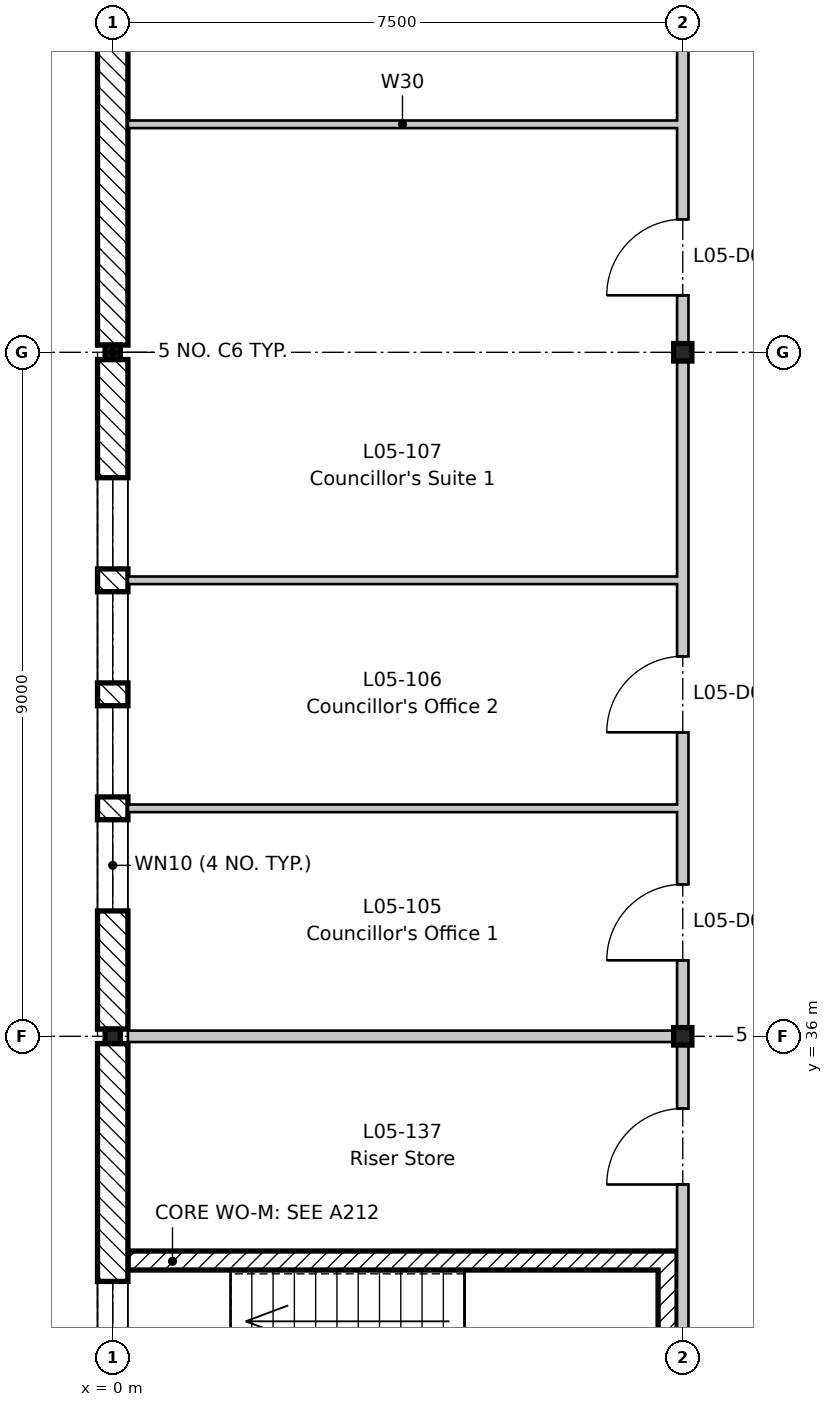
"""IFC4 building model, lengths in metres.
Left out: names, types, materials, properties, quantities, classifications, styles, units other than length and angle.
Written with IfcOpenShell. Run it as: python <this file> out.ifc"""

import sys

from ifc_helpers import new_model, si_unit, direction, frame, frame_2d, origin, origin_2d, place, context, subcontext, project, spatial, rectangle, i_section, extrude, element, fill, save


model = new_model("IFC4")
c1 = context("Model", 3, precision=1e-05, world=origin(), true_north=direction((0.0, 1.0)))
c2 = subcontext(c1, "Body", "Model", "MODEL_VIEW")
j1 = project(units=[si_unit("LENGTHUNIT", "METRE"), si_unit("PLANEANGLEUNIT", "RADIAN")], contexts=[c1])
p1 = place(None, origin())
s1 = spatial("IfcSite", under=j1, at=p1, CompositionType="ELEMENT")
p2 = place(p1, origin())
s2 = spatial("IfcBuilding", under=s1, at=p2, CompositionType="ELEMENT")
p3 = place(p2, frame((0.0, 0.0, 22.8)))
s3 = spatial("IfcBuildingStorey", under=s2, at=p3, CompositionType="ELEMENT", Elevation=22.8)
for number, where, z_axis, x_axis in (
    (1, (0.0, 36.0, -0.2), (0.0, 0.0, 1.0), (1.0, 0.0, 0.0)),
    (2, (0.0, 45.0, -0.2), (0.0, 0.0, 1.0), (1.0, 0.0, 0.0)),
):
    element("IfcColumn", number, at=place(p3, frame(where, z_axis=z_axis, x_axis=x_axis)), inside=s3, PredefinedType="COLUMN", context=c2, shape_type="SweptSolid", body=[
        extrude(i_section(OverallWidth=0.2, OverallDepth=0.19, WebThickness=0.007, FlangeThickness=0.01, FilletRadius=0.018, at=origin_2d()), origin(), (0.0, 0.0, 1.0), 4.15),
    ])
for number, where, z_axis, x_axis in (
    (3, (7.5, 36.0, -0.2), (0.0, 0.0, 1.0), (1.0, 0.0, 0.0)),
    (4, (7.5, 45.0, -0.2), (0.0, 0.0, 1.0), (1.0, 0.0, 0.0)),
):
    element("IfcColumn", number, at=place(p3, frame(where, z_axis=z_axis, x_axis=x_axis)), inside=s3, PredefinedType="COLUMN", context=c2, shape_type="SweptSolid", body=[
        extrude(i_section(OverallWidth=0.24, OverallDepth=0.23, WebThickness=0.008, FlangeThickness=0.012, FilletRadius=0.021, at=origin_2d()), origin(), (0.0, 0.0, 1.0), 4.15),
    ])
p4 = place(p3, frame((0.2, 33.05, 0.0), z_axis=(0.0, 0.0, 1.0), x_axis=(1.0, 0.0, 0.0)))
e5 = element("IfcWall", 5, at=p4, inside=s3, PredefinedType="SHEAR", context=c2, shape_type="SweptSolid", body=[
    extrude(rectangle(XDim=7.225, YDim=0.25, at=frame_2d((3.613, 0.0))), origin(), (0.0, 0.0, 1.0), 3.95),
])
p5 = place(p3, frame((7.3, 30.075, 0.0), z_axis=(0.0, 0.0, 1.0), x_axis=(0.0, 1.0, 0.0)))
e6 = element("IfcWall", 6, at=p5, inside=s3, PredefinedType="SHEAR", context=c2, shape_type="SweptSolid", body=[
    extrude(rectangle(XDim=2.85, YDim=0.25, at=frame_2d((1.425, 0.0))), origin(), (0.0, 0.0, 1.0), 3.95),
])
p6 = place(p3, frame((0.0, 27.095, 0.0), z_axis=(0.0, 0.0, 1.0), x_axis=(0.0, 1.0, 0.0)))
e7 = element("IfcWall", 7, at=p6, inside=s3, PredefinedType="STANDARD", context=c2, shape_type="SweptSolid", body=[
    extrude(rectangle(XDim=8.81, YDim=0.4, at=frame_2d((4.405, 0.0))), origin(), (0.0, 0.0, 1.0), 3.55),
])
p7 = place(p6, frame((3.13, 0.0, 0.9)))
e8 = element("IfcOpeningElement", 8, at=p7, cuts=e7, PredefinedType="OPENING", context=c2, shape_type="SweptSolid", body=[
    extrude(rectangle(XDim=1.05, YDim=2.6, at=frame_2d((0.525, 1.3))), frame((0.0, 0.21, 0.0), z_axis=(0.0, -1.0, 0.0), x_axis=(1.0, 0.0, 0.0)), (0.0, 0.0, 1.0), 0.42),
])
p8 = place(p6, frame((4.63, 0.0, 0.9)))
e9 = element("IfcOpeningElement", 9, at=p8, cuts=e7, PredefinedType="OPENING", context=c2, shape_type="SweptSolid", body=[
    extrude(rectangle(XDim=1.05, YDim=2.6, at=frame_2d((0.525, 1.3))), frame((0.0, 0.21, 0.0), z_axis=(0.0, -1.0, 0.0), x_axis=(1.0, 0.0, 0.0)), (0.0, 0.0, 1.0), 0.42),
])
p9 = place(p3, frame((0.0, 36.095, 0.0), z_axis=(0.0, 0.0, 1.0), x_axis=(0.0, 1.0, 0.0)))
e10 = element("IfcWall", 10, at=p9, inside=s3, PredefinedType="STANDARD", context=c2, shape_type="SweptSolid", body=[
    extrude(rectangle(XDim=8.81, YDim=0.4, at=frame_2d((4.405, 0.0))), origin(), (0.0, 0.0, 1.0), 3.55),
])
p10 = place(p9, frame((1.555, 0.0, 0.6)))
e11 = element("IfcOpeningElement", 11, at=p10, cuts=e10, PredefinedType="OPENING", context=c2, shape_type="SweptSolid", body=[
    extrude(rectangle(XDim=1.2, YDim=1.8, at=frame_2d((0.6, 0.9))), frame((0.0, 0.21, 0.0), z_axis=(0.0, -1.0, 0.0), x_axis=(1.0, 0.0, 0.0)), (0.0, 0.0, 1.0), 0.42),
])
p11 = place(p9, frame((3.055, 0.0, 0.6)))
e12 = element("IfcOpeningElement", 12, at=p11, cuts=e10, PredefinedType="OPENING", context=c2, shape_type="SweptSolid", body=[
    extrude(rectangle(XDim=1.2, YDim=1.8, at=frame_2d((0.6, 0.9))), frame((0.0, 0.21, 0.0), z_axis=(0.0, -1.0, 0.0), x_axis=(1.0, 0.0, 0.0)), (0.0, 0.0, 1.0), 0.42),
])
p12 = place(p9, frame((4.555, 0.0, 0.6)))
e13 = element("IfcOpeningElement", 13, at=p12, cuts=e10, PredefinedType="OPENING", context=c2, shape_type="SweptSolid", body=[
    extrude(rectangle(XDim=1.2, YDim=1.8, at=frame_2d((0.6, 0.9))), frame((0.0, 0.21, 0.0), z_axis=(0.0, -1.0, 0.0), x_axis=(1.0, 0.0, 0.0)), (0.0, 0.0, 1.0), 0.42),
])
p13 = place(p9, frame((6.055, 0.0, 0.6)))
e14 = element("IfcOpeningElement", 14, at=p13, cuts=e10, PredefinedType="OPENING", context=c2, shape_type="SweptSolid", body=[
    extrude(rectangle(XDim=1.2, YDim=1.8, at=frame_2d((0.6, 0.9))), frame((0.0, 0.21, 0.0), z_axis=(0.0, -1.0, 0.0), x_axis=(1.0, 0.0, 0.0)), (0.0, 0.0, 1.0), 0.42),
])
p14 = place(p3, frame((0.0, 45.095, 0.0), z_axis=(0.0, 0.0, 1.0), x_axis=(0.0, 1.0, 0.0)))
e15 = element("IfcWall", 15, at=p14, inside=s3, PredefinedType="STANDARD", context=c2, shape_type="SweptSolid", body=[
    extrude(rectangle(XDim=8.81, YDim=0.4, at=frame_2d((4.405, 0.0))), origin(), (0.0, 0.0, 1.0), 3.55),
])
p15 = place(p3, frame((0.2, 36.0, 0.0), z_axis=(0.0, 0.0, 1.0), x_axis=(1.0, 0.0, 0.0)))
e16 = element("IfcWall", 16, at=p15, inside=s3, PredefinedType="PARTITIONING", context=c2, shape_type="SweptSolid", body=[
    extrude(rectangle(XDim=7.225, YDim=0.15, at=frame_2d((3.613, 0.0))), origin(), (0.0, 0.0, 1.0), 3.6),
])
for number, where, z_axis, x_axis in (
    (17, (0.2, 39.0, 0.0), (0.0, 0.0, 1.0), (1.0, 0.0, 0.0)),
    (18, (0.2, 42.0, 0.0), (0.0, 0.0, 1.0), (1.0, 0.0, 0.0)),
    (19, (0.2, 48.0, 0.0), (0.0, 0.0, 1.0), (1.0, 0.0, 0.0)),
):
    element("IfcWall", number, at=place(p3, frame(where, z_axis=z_axis, x_axis=x_axis)), inside=s3, PredefinedType="PARTITIONING", context=c2, shape_type="SweptSolid", body=[
        extrude(rectangle(XDim=7.225, YDim=0.1, at=frame_2d((3.613, 0.0))), origin(), (0.0, 0.0, 1.0), 3.95),
    ])
p16 = place(p3, frame((7.5, -8.8, 0.0), z_axis=(0.0, 0.0, 1.0), x_axis=(0.0, 1.0, 0.0)))
e20 = element("IfcWall", 20, at=p16, inside=s3, PredefinedType="PARTITIONING", context=c2, shape_type="SweptSolid", body=[
    extrude(rectangle(XDim=79.3, YDim=0.15, at=frame_2d((39.65, 0.0))), origin(), (0.0, 0.0, 1.0), 3.43),
])
p17 = place(p16, frame((18.8, 0.0, 0.0)))
e21 = element("IfcOpeningElement", 21, at=p17, cuts=e20, PredefinedType="OPENING", context=c2, shape_type="SweptSolid", body=[
    extrude(rectangle(XDim=1.0, YDim=2.1, at=frame_2d((0.5, 1.05))), frame((0.0, 0.085, 0.0), z_axis=(0.0, -1.0, 0.0), x_axis=(1.0, 0.0, 0.0)), (0.0, 0.0, 1.0), 0.17),
])
p18 = place(p16, frame((23.3, 0.0, 0.0)))
e22 = element("IfcOpeningElement", 22, at=p18, cuts=e20, PredefinedType="OPENING", context=c2, shape_type="SweptSolid", body=[
    extrude(rectangle(XDim=1.0, YDim=2.1, at=frame_2d((0.5, 1.05))), frame((0.0, 0.085, 0.0), z_axis=(0.0, -1.0, 0.0), x_axis=(1.0, 0.0, 0.0)), (0.0, 0.0, 1.0), 0.17),
])
p19 = place(p16, frame((27.8, 0.0, 0.0)))
e23 = element("IfcOpeningElement", 23, at=p19, cuts=e20, PredefinedType="OPENING", context=c2, shape_type="SweptSolid", body=[
    extrude(rectangle(XDim=1.0, YDim=2.1, at=frame_2d((0.5, 1.05))), frame((0.0, 0.085, 0.0), z_axis=(0.0, -1.0, 0.0), x_axis=(1.0, 0.0, 0.0)), (0.0, 0.0, 1.0), 0.17),
])
p20 = place(p16, frame((32.3, 0.0, 0.0)))
e24 = element("IfcOpeningElement", 24, at=p20, cuts=e20, PredefinedType="OPENING", context=c2, shape_type="SweptSolid", body=[
    extrude(rectangle(XDim=1.0, YDim=2.1, at=frame_2d((0.5, 1.05))), frame((0.0, 0.085, 0.0), z_axis=(0.0, -1.0, 0.0), x_axis=(1.0, 0.0, 0.0)), (0.0, 0.0, 1.0), 0.17),
])
p21 = place(p16, frame((45.8, 0.0, 0.0)))
e25 = element("IfcOpeningElement", 25, at=p21, cuts=e20, PredefinedType="OPENING", context=c2, shape_type="SweptSolid", body=[
    extrude(rectangle(XDim=1.0, YDim=2.1, at=frame_2d((0.5, 1.05))), frame((0.0, 0.085, 0.0), z_axis=(0.0, -1.0, 0.0), x_axis=(1.0, 0.0, 0.0)), (0.0, 0.0, 1.0), 0.17),
])
p22 = place(p16, frame((48.8, 0.0, 0.0)))
e26 = element("IfcOpeningElement", 26, at=p22, cuts=e20, PredefinedType="OPENING", context=c2, shape_type="SweptSolid", body=[
    extrude(rectangle(XDim=1.0, YDim=2.1, at=frame_2d((0.5, 1.05))), frame((0.0, 0.085, 0.0), z_axis=(0.0, -1.0, 0.0), x_axis=(1.0, 0.0, 0.0)), (0.0, 0.0, 1.0), 0.17),
])
p23 = place(p16, frame((54.55, 0.0, 0.0)))
e27 = element("IfcOpeningElement", 27, at=p23, cuts=e20, PredefinedType="OPENING", context=c2, shape_type="SweptSolid", body=[
    extrude(rectangle(XDim=1.0, YDim=2.1, at=frame_2d((0.5, 1.05))), frame((0.0, 0.085, 0.0), z_axis=(0.0, -1.0, 0.0), x_axis=(1.0, 0.0, 0.0)), (0.0, 0.0, 1.0), 0.17),
])
p24 = place(p16, frame((57.8, 0.0, 0.0)))
e28 = element("IfcOpeningElement", 28, at=p24, cuts=e20, PredefinedType="OPENING", context=c2, shape_type="SweptSolid", body=[
    extrude(rectangle(XDim=1.0, YDim=2.1, at=frame_2d((0.5, 1.05))), frame((0.0, 0.085, 0.0), z_axis=(0.0, -1.0, 0.0), x_axis=(1.0, 0.0, 0.0)), (0.0, 0.0, 1.0), 0.17),
])
p25 = place(p16, frame((60.8, 0.0, 0.0)))
e29 = element("IfcOpeningElement", 29, at=p25, cuts=e20, PredefinedType="OPENING", context=c2, shape_type="SweptSolid", body=[
    extrude(rectangle(XDim=1.0, YDim=2.1, at=frame_2d((0.5, 1.05))), frame((0.0, 0.085, 0.0), z_axis=(0.0, -1.0, 0.0), x_axis=(1.0, 0.0, 0.0)), (0.0, 0.0, 1.0), 0.17),
])
p26 = place(p16, frame((12.6, 0.0, 0.0)))
e30 = element("IfcOpeningElement", 30, at=p26, cuts=e20, PredefinedType="OPENING", context=c2, shape_type="SweptSolid", body=[
    extrude(rectangle(XDim=1.4, YDim=2.1, at=frame_2d((0.7, 1.05))), frame((0.0, 0.085, 0.0), z_axis=(0.0, -1.0, 0.0), x_axis=(1.0, 0.0, 0.0)), (0.0, 0.0, 1.0), 0.17),
])
p27 = place(p16, frame((3.6, 0.0, 0.0)))
e31 = element("IfcOpeningElement", 31, at=p27, cuts=e20, PredefinedType="OPENING", context=c2, shape_type="SweptSolid", body=[
    extrude(rectangle(XDim=1.4, YDim=2.1, at=frame_2d((0.7, 1.05))), frame((0.0, 0.085, 0.0), z_axis=(0.0, -1.0, 0.0), x_axis=(1.0, 0.0, 0.0)), (0.0, 0.0, 1.0), 0.17),
])
p28 = place(p16, frame((63.55, 0.0, 0.0)))
e32 = element("IfcOpeningElement", 32, at=p28, cuts=e20, PredefinedType="OPENING", context=c2, shape_type="SweptSolid", body=[
    extrude(rectangle(XDim=1.4, YDim=2.1, at=frame_2d((0.7, 1.05))), frame((0.0, 0.085, 0.0), z_axis=(0.0, -1.0, 0.0), x_axis=(1.0, 0.0, 0.0)), (0.0, 0.0, 1.0), 0.17),
])
p29 = place(p16, frame((69.6, 0.0, 0.0)))
e33 = element("IfcOpeningElement", 33, at=p29, cuts=e20, PredefinedType="OPENING", context=c2, shape_type="SweptSolid", body=[
    extrude(rectangle(XDim=1.4, YDim=2.1, at=frame_2d((0.7, 1.05))), frame((0.0, 0.085, 0.0), z_axis=(0.0, -1.0, 0.0), x_axis=(1.0, 0.0, 0.0)), (0.0, 0.0, 1.0), 0.17),
])
p30 = place(p16, frame((42.85, 0.0, 0.0)))
e34 = element("IfcOpeningElement", 34, at=p30, cuts=e20, PredefinedType="OPENING", context=c2, shape_type="SweptSolid", body=[
    extrude(rectangle(XDim=1.0, YDim=2.1, at=frame_2d((0.5, 1.05))), frame((0.0, 0.085, 0.0), z_axis=(0.0, -1.0, 0.0), x_axis=(1.0, 0.0, 0.0)), (0.0, 0.0, 1.0), 0.17),
])
p31 = place(p16, frame((36.55, 0.0, 0.0)))
e35 = element("IfcOpeningElement", 35, at=p31, cuts=e20, PredefinedType="OPENING", context=c2, shape_type="SweptSolid", body=[
    extrude(rectangle(XDim=1.4, YDim=2.1, at=frame_2d((0.7, 1.05))), frame((0.0, 0.085, 0.0), z_axis=(0.0, -1.0, 0.0), x_axis=(1.0, 0.0, 0.0)), (0.0, 0.0, 1.0), 0.17),
])
p32 = place(p16, frame((72.8, 0.0, 0.0)))
e36 = element("IfcOpeningElement", 36, at=p32, cuts=e20, PredefinedType="OPENING", context=c2, shape_type="SweptSolid", body=[
    extrude(rectangle(XDim=1.0, YDim=2.1, at=frame_2d((0.5, 1.05))), frame((0.0, 0.085, 0.0), z_axis=(0.0, -1.0, 0.0), x_axis=(1.0, 0.0, 0.0)), (0.0, 0.0, 1.0), 0.17),
])
p33 = place(p8, origin())
e37 = element("IfcWindow", 37, at=p33, inside=s3, PartitioningType="SINGLE_PANEL", PredefinedType="WINDOW", context=c2, shape_type="SweptSolid", body=[
    extrude(rectangle(XDim=1.05, YDim=2.6, at=frame_2d((0.525, 1.3))), frame((0.0, 0.03, 0.0), z_axis=(0.0, -1.0, 0.0), x_axis=(1.0, 0.0, 0.0)), (0.0, 0.0, 1.0), 0.06),
])
fill(e9, e37)
p34 = place(p10, origin())
e38 = element("IfcWindow", 38, at=p34, inside=s3, PartitioningType="SINGLE_PANEL", PredefinedType="WINDOW", context=c2, shape_type="SweptSolid", body=[
    extrude(rectangle(XDim=1.2, YDim=1.8, at=frame_2d((0.6, 0.9))), frame((0.0, 0.03, 0.0), z_axis=(0.0, -1.0, 0.0), x_axis=(1.0, 0.0, 0.0)), (0.0, 0.0, 1.0), 0.06),
])
fill(e11, e38)
p35 = place(p11, origin())
e39 = element("IfcWindow", 39, at=p35, inside=s3, PartitioningType="SINGLE_PANEL", PredefinedType="WINDOW", context=c2, shape_type="SweptSolid", body=[
    extrude(rectangle(XDim=1.2, YDim=1.8, at=frame_2d((0.6, 0.9))), frame((0.0, 0.03, 0.0), z_axis=(0.0, -1.0, 0.0), x_axis=(1.0, 0.0, 0.0)), (0.0, 0.0, 1.0), 0.06),
])
fill(e12, e39)
p36 = place(p12, origin())
e40 = element("IfcWindow", 40, at=p36, inside=s3, PartitioningType="SINGLE_PANEL", PredefinedType="WINDOW", context=c2, shape_type="SweptSolid", body=[
    extrude(rectangle(XDim=1.2, YDim=1.8, at=frame_2d((0.6, 0.9))), frame((0.0, 0.03, 0.0), z_axis=(0.0, -1.0, 0.0), x_axis=(1.0, 0.0, 0.0)), (0.0, 0.0, 1.0), 0.06),
])
fill(e13, e40)
p37 = place(p13, origin())
e41 = element("IfcWindow", 41, at=p37, inside=s3, PartitioningType="SINGLE_PANEL", PredefinedType="WINDOW", context=c2, shape_type="SweptSolid", body=[
    extrude(rectangle(XDim=1.2, YDim=1.8, at=frame_2d((0.6, 0.9))), frame((0.0, 0.03, 0.0), z_axis=(0.0, -1.0, 0.0), x_axis=(1.0, 0.0, 0.0)), (0.0, 0.0, 1.0), 0.06),
])
fill(e14, e41)
p38 = place(p21, origin())
e42 = element("IfcDoor", 42, at=p38, inside=s3, OperationType="SINGLE_SWING_LEFT", PredefinedType="DOOR", context=c2, shape_type="SweptSolid", body=[
    extrude(rectangle(XDim=1.0, YDim=2.1, at=frame_2d((0.5, 1.05))), frame((0.0, 0.025, 0.0), z_axis=(0.0, -1.0, 0.0), x_axis=(1.0, 0.0, 0.0)), (0.0, 0.0, 1.0), 0.05),
])
fill(e25, e42)
p39 = place(p22, origin())
e43 = element("IfcDoor", 43, at=p39, inside=s3, OperationType="SINGLE_SWING_LEFT", PredefinedType="DOOR", context=c2, shape_type="SweptSolid", body=[
    extrude(rectangle(XDim=1.0, YDim=2.1, at=frame_2d((0.5, 1.05))), frame((0.0, 0.025, 0.0), z_axis=(0.0, -1.0, 0.0), x_axis=(1.0, 0.0, 0.0)), (0.0, 0.0, 1.0), 0.05),
])
fill(e26, e43)
p40 = place(p23, origin())
e44 = element("IfcDoor", 44, at=p40, inside=s3, OperationType="SINGLE_SWING_LEFT", PredefinedType="DOOR", context=c2, shape_type="SweptSolid", body=[
    extrude(rectangle(XDim=1.0, YDim=2.1, at=frame_2d((0.5, 1.05))), frame((0.0, 0.025, 0.0), z_axis=(0.0, -1.0, 0.0), x_axis=(1.0, 0.0, 0.0)), (0.0, 0.0, 1.0), 0.05),
])
fill(e27, e44)
p41 = place(p30, origin())
e45 = element("IfcDoor", 45, at=p41, inside=s3, OperationType="SINGLE_SWING_LEFT", PredefinedType="DOOR", context=c2, shape_type="SweptSolid", body=[
    extrude(rectangle(XDim=1.0, YDim=2.1, at=frame_2d((0.5, 1.05))), frame((0.0, 0.025, 0.0), z_axis=(0.0, -1.0, 0.0), x_axis=(1.0, 0.0, 0.0)), (0.0, 0.0, 1.0), 0.05),
])
fill(e34, e45)
save(model, sys.argv[1])
